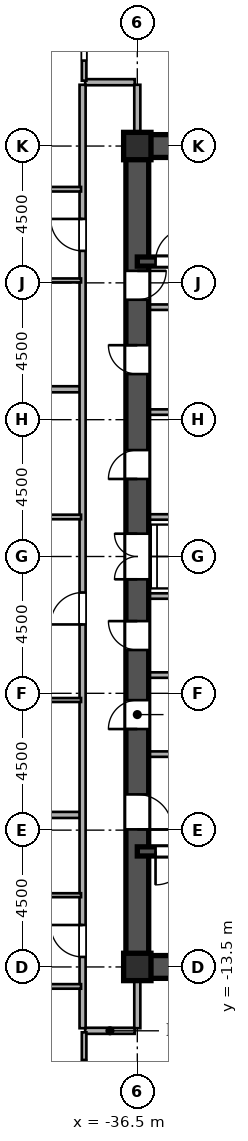
"""IFC4 building model, lengths in metres.
Left out: names, types, materials, properties, quantities, classifications, styles, units other than length and angle.
Written with IfcOpenShell. Run it as: python <this file> out.ifc"""

import sys

from ifc_helpers import new_model, si_unit, direction, frame, frame_2d, origin, origin_2d, place, context, subcontext, project, spatial, rectangle, i_section, extrude, source, transform, mapped, element, fill, save


model = new_model("IFC4")
c1 = context("Model", 3, precision=1e-05, world=origin(), true_north=direction((0.0, 1.0)))
c2 = subcontext(c1, "Body", "Model", "MODEL_VIEW")
j1 = project(units=[si_unit("LENGTHUNIT", "METRE"), si_unit("PLANEANGLEUNIT", "RADIAN")], contexts=[c1])
p1 = place(None, origin())
s1 = spatial("IfcSite", under=j1, at=p1, CompositionType="ELEMENT")
p2 = place(p1, origin())
s2 = spatial("IfcBuilding", under=s1, at=p2, CompositionType="ELEMENT")
p3 = place(p2, frame((0.0, 0.0, 47.7)))
s3 = spatial("IfcBuildingStorey", under=s2, at=p3, CompositionType="ELEMENT", Elevation=47.7)
m1 = source(origin(), c2, "Body", "SweptSolid", [
    extrude(i_section(OverallWidth=0.9, OverallDepth=0.9, WebThickness=0.036, FlangeThickness=0.055, at=origin_2d()), origin(), (0.0, 0.0, 1.0), 3.6),
])
for number, where, z_axis, x_axis in (
    (1, (-36.5, -13.5, 0.0), (0.0, 0.0, 1.0), (1.0, 0.0, 0.0)),
    (2, (-36.5, 13.5, 0.0), (0.0, 0.0, 1.0), (1.0, 0.0, 0.0)),
):
    element("IfcColumn", number, at=place(p3, frame(where, z_axis=z_axis, x_axis=x_axis)), inside=s3, PredefinedType="COLUMN", context=c2, shape_type="MappedRepresentation", body=[
        mapped(m1, transform((0.0, 0.0, 0.0), scale=1.0)),
    ])
for number, where, z_axis, x_axis in (
    (3, (-36.5, -13.5, 0.0), (0.0, 0.0, 1.0), (1.0, 0.0, 0.0)),
    (4, (-36.5, 13.5, 0.0), (0.0, 0.0, 1.0), (1.0, 0.0, 0.0)),
):
    element("IfcWall", number, at=place(p3, frame(where, z_axis=z_axis, x_axis=x_axis)), inside=s3, PredefinedType="SHEAR", context=c2, shape_type="SweptSolid", body=[
        extrude(rectangle(XDim=9.0, YDim=0.75, at=frame_2d((4.5, 0.0))), origin(), (0.0, 0.0, 1.0), 3.38),
    ])
p4 = place(p3, frame((-36.5, -13.65, 0.0), z_axis=(0.0, 0.0, 1.0), x_axis=(0.0, 1.0, 0.0)))
e5 = element("IfcWall", 5, at=p4, inside=s3, PredefinedType="SHEAR", context=c2, shape_type="SweptSolid", body=[
    extrude(rectangle(XDim=7.15, YDim=0.75, at=frame_2d((3.575, 0.0))), origin(), (0.0, 0.0, 1.0), 3.38),
])
p5 = place(p4, frame((4.675, 0.0, 0.0)))
e6 = element("IfcOpeningElement", 6, at=p5, cuts=e5, PredefinedType="OPENING", context=c2, shape_type="SweptSolid", body=[
    extrude(rectangle(XDim=1.15, YDim=2.2, at=frame_2d((0.575, 1.1))), frame((0.0, 0.385, 0.0), z_axis=(0.0, -1.0, 0.0), x_axis=(1.0, 0.0, 0.0)), (0.0, 0.0, 1.0), 0.77),
])
p6 = place(p3, frame((-36.5, -1.3, 0.0), z_axis=(0.0, 0.0, 1.0), x_axis=(0.0, 1.0, 0.0)))
e7 = element("IfcWall", 7, at=p6, inside=s3, PredefinedType="SHEAR", context=c2, shape_type="SweptSolid", body=[
    extrude(rectangle(XDim=2.6, YDim=0.75, at=frame_2d((1.3, 0.0))), origin(), (0.0, 0.0, 1.0), 3.38),
])
p7 = place(p6, frame((0.55, 0.0, 0.0)))
e8 = element("IfcOpeningElement", 8, at=p7, cuts=e7, PredefinedType="OPENING", context=c2, shape_type="SweptSolid", body=[
    extrude(rectangle(XDim=1.5, YDim=2.3, at=frame_2d((0.75, 1.15))), frame((0.0, 0.385, 0.0), z_axis=(0.0, -1.0, 0.0), x_axis=(1.0, 0.0, 0.0)), (0.0, 0.0, 1.0), 0.77),
])
p8 = place(p3, frame((-36.5, 8.2, 0.0), z_axis=(0.0, 0.0, 1.0), x_axis=(0.0, 1.0, 0.0)))
e9 = element("IfcWall", 9, at=p8, inside=s3, PredefinedType="SHEAR", context=c2, shape_type="SweptSolid", body=[
    extrude(rectangle(XDim=5.45, YDim=0.75, at=frame_2d((2.725, 0.0))), origin(), (0.0, 0.0, 1.0), 3.38),
])
p9 = place(p8, frame((0.245, 0.0, 0.0)))
e10 = element("IfcOpeningElement", 10, at=p9, cuts=e9, PredefinedType="OPENING", context=c2, shape_type="SweptSolid", body=[
    extrude(rectangle(XDim=0.95, YDim=2.15, at=frame_2d((0.475, 1.075))), frame((0.0, 0.385, 0.0), z_axis=(0.0, -1.0, 0.0), x_axis=(1.0, 0.0, 0.0)), (0.0, 0.0, 1.0), 0.77),
])
p10 = place(p3, frame((-36.5, -6.5, 0.0), z_axis=(0.0, 0.0, 1.0), x_axis=(0.0, 1.0, 0.0)))
e11 = element("IfcWall", 11, at=p10, inside=s3, PredefinedType="SHEAR", context=c2, shape_type="SweptSolid", body=[
    extrude(rectangle(XDim=2.6, YDim=0.75, at=frame_2d((1.3, 0.0))), origin(), (0.0, 0.0, 1.0), 3.38),
])
p11 = place(p10, frame((0.825, 0.0, 0.0)))
e12 = element("IfcOpeningElement", 12, at=p11, cuts=e11, PredefinedType="OPENING", context=c2, shape_type="SweptSolid", body=[
    extrude(rectangle(XDim=0.95, YDim=2.15, at=frame_2d((0.475, 1.075))), frame((0.0, 0.385, 0.0), z_axis=(0.0, -1.0, 0.0), x_axis=(1.0, 0.0, 0.0)), (0.0, 0.0, 1.0), 0.77),
])
p12 = place(p3, frame((-36.5, -3.9, 0.0), z_axis=(0.0, 0.0, 1.0), x_axis=(0.0, 1.0, 0.0)))
e13 = element("IfcWall", 13, at=p12, inside=s3, PredefinedType="SHEAR", context=c2, shape_type="SweptSolid", body=[
    extrude(rectangle(XDim=2.6, YDim=0.75, at=frame_2d((1.3, 0.0))), origin(), (0.0, 0.0, 1.0), 3.38),
])
p13 = place(p12, frame((0.825, 0.0, 0.0)))
e14 = element("IfcOpeningElement", 14, at=p13, cuts=e13, PredefinedType="OPENING", context=c2, shape_type="SweptSolid", body=[
    extrude(rectangle(XDim=0.95, YDim=2.15, at=frame_2d((0.475, 1.075))), frame((0.0, 0.385, 0.0), z_axis=(0.0, -1.0, 0.0), x_axis=(1.0, 0.0, 0.0)), (0.0, 0.0, 1.0), 0.77),
])
p14 = place(p3, frame((-36.5, 1.3, 0.0), z_axis=(0.0, 0.0, 1.0), x_axis=(0.0, 1.0, 0.0)))
e15 = element("IfcWall", 15, at=p14, inside=s3, PredefinedType="SHEAR", context=c2, shape_type="SweptSolid", body=[
    extrude(rectangle(XDim=3.45, YDim=0.75, at=frame_2d((1.725, 0.0))), origin(), (0.0, 0.0, 1.0), 3.38),
])
p15 = place(p14, frame((1.25, 0.0, 0.0)))
e16 = element("IfcOpeningElement", 16, at=p15, cuts=e15, PredefinedType="OPENING", context=c2, shape_type="SweptSolid", body=[
    extrude(rectangle(XDim=0.95, YDim=2.15, at=frame_2d((0.475, 1.075))), frame((0.0, 0.385, 0.0), z_axis=(0.0, -1.0, 0.0), x_axis=(1.0, 0.0, 0.0)), (0.0, 0.0, 1.0), 0.77),
])
p16 = place(p3, frame((-36.5, 4.75, 0.0), z_axis=(0.0, 0.0, 1.0), x_axis=(0.0, 1.0, 0.0)))
e17 = element("IfcWall", 17, at=p16, inside=s3, PredefinedType="SHEAR", context=c2, shape_type="SweptSolid", body=[
    extrude(rectangle(XDim=3.45, YDim=0.75, at=frame_2d((1.725, 0.0))), origin(), (0.0, 0.0, 1.0), 3.38),
])
p17 = place(p16, frame((1.25, 0.0, 0.0)))
e18 = element("IfcOpeningElement", 18, at=p17, cuts=e17, PredefinedType="OPENING", context=c2, shape_type="SweptSolid", body=[
    extrude(rectangle(XDim=0.95, YDim=2.15, at=frame_2d((0.475, 1.075))), frame((0.0, 0.385, 0.0), z_axis=(0.0, -1.0, 0.0), x_axis=(1.0, 0.0, 0.0)), (0.0, 0.0, 1.0), 0.77),
])
p18 = place(p3, frame((-36.5, -9.7, 0.0), z_axis=(0.0, 0.0, 1.0), x_axis=(1.0, 0.0, 0.0)))
e19 = element("IfcWall", 19, at=p18, inside=s3, PredefinedType="SHEAR", context=c2, shape_type="SweptSolid", body=[
    extrude(rectangle(XDim=9.0, YDim=0.3, at=frame_2d((4.5, 0.0))), origin(), (0.0, 0.0, 1.0), 3.38),
])
p19 = place(p18, frame((0.6, 0.0, 0.0)))
e20 = element("IfcOpeningElement", 20, at=p19, cuts=e19, PredefinedType="OPENING", context=c2, shape_type="SweptSolid", body=[
    extrude(rectangle(XDim=1.1, YDim=2.2, at=frame_2d((0.55, 1.1))), frame((0.0, 0.16, 0.0), z_axis=(0.0, -1.0, 0.0), x_axis=(1.0, 0.0, 0.0)), (0.0, 0.0, 1.0), 0.32),
])
p20 = place(p3, frame((-36.5, 9.7, 0.0), z_axis=(0.0, 0.0, 1.0), x_axis=(1.0, 0.0, 0.0)))
e21 = element("IfcWall", 21, at=p20, inside=s3, PredefinedType="SHEAR", context=c2, shape_type="SweptSolid", body=[
    extrude(rectangle(XDim=9.0, YDim=0.3, at=frame_2d((4.5, 0.0))), origin(), (0.0, 0.0, 1.0), 3.38),
])
p21 = place(p20, frame((0.6, 0.0, 0.0)))
e22 = element("IfcOpeningElement", 22, at=p21, cuts=e21, PredefinedType="OPENING", context=c2, shape_type="SweptSolid", body=[
    extrude(rectangle(XDim=1.1, YDim=2.2, at=frame_2d((0.55, 1.1))), frame((0.0, 0.16, 0.0), z_axis=(0.0, -1.0, 0.0), x_axis=(1.0, 0.0, 0.0)), (0.0, 0.0, 1.0), 0.32),
])
for number, where, z_axis, x_axis in (
    (23, (-36.15, -6.5, 0.0), (0.0, 0.0, 1.0), (1.0, 0.0, 0.0)),
    (24, (-36.15, 8.2, 0.0), (0.0, 0.0, 1.0), (1.0, 0.0, 0.0)),
):
    element("IfcWall", number, at=place(p3, frame(where, z_axis=z_axis, x_axis=x_axis)), inside=s3, PredefinedType="PARTITIONING", context=c2, shape_type="SweptSolid", body=[
        extrude(rectangle(XDim=5.7, YDim=0.18, at=frame_2d((2.85, 0.0))), origin(), (0.0, 0.0, 1.0), 3.38),
    ])
for number, where, z_axis, x_axis in (
    (25, (-36.15, -1.3, 0.0), (0.0, 0.0, 1.0), (1.0, 0.0, 0.0)),
    (26, (-36.15, 1.3, 0.0), (0.0, 0.0, 1.0), (1.0, 0.0, 0.0)),
    (27, (-36.15, -3.9, 0.0), (0.0, 0.0, 1.0), (1.0, 0.0, 0.0)),
    (28, (-36.15, 4.75, 0.0), (0.0, 0.0, 1.0), (1.0, 0.0, 0.0)),
):
    element("IfcWall", number, at=place(p3, frame(where, z_axis=z_axis, x_axis=x_axis)), inside=s3, PredefinedType="PARTITIONING", context=c2, shape_type="SweptSolid", body=[
        extrude(rectangle(XDim=2.95, YDim=0.18, at=frame_2d((1.475, 0.0))), origin(), (0.0, 0.0, 1.0), 3.38),
    ])
p22 = place(p3, frame((-38.215, -15.6, 0.0), z_axis=(0.0, 0.0, 1.0), x_axis=(1.0, 0.0, 0.0)))
e29 = element("IfcWall", 29, at=p22, inside=s3, PredefinedType="PARTITIONING", context=c2, shape_type="SweptSolid", body=[
    extrude(rectangle(XDim=1.63, YDim=0.2, at=frame_2d((0.815, 0.0))), origin(), (0.0, 0.0, 1.0), 3.38),
])
p23 = place(p3, frame((-44.45, -14.14, 0.0), z_axis=(0.0, 0.0, 1.0), x_axis=(1.0, 0.0, 0.0)))
e30 = element("IfcWall", 30, at=p23, inside=s3, PredefinedType="PARTITIONING", context=c2, shape_type="SweptSolid", body=[
    extrude(rectangle(XDim=6.1, YDim=0.15, at=frame_2d((3.05, 0.0))), origin(), (0.0, 0.0, 1.0), 3.38),
])
p24 = place(p23, frame((2.575, 0.0, 0.0)))
e31 = element("IfcOpeningElement", 31, at=p24, cuts=e30, PredefinedType="OPENING", context=c2, shape_type="SweptSolid", body=[
    extrude(rectangle(XDim=0.95, YDim=2.15, at=frame_2d((0.475, 1.075))), frame((0.0, 0.085, 0.0), z_axis=(0.0, -1.0, 0.0), x_axis=(1.0, 0.0, 0.0)), (0.0, 0.0, 1.0), 0.17),
])
p25 = place(p3, frame((-44.45, -11.14, 0.0), z_axis=(0.0, 0.0, 1.0), x_axis=(1.0, 0.0, 0.0)))
e32 = element("IfcWall", 32, at=p25, inside=s3, PredefinedType="PARTITIONING", context=c2, shape_type="SweptSolid", body=[
    extrude(rectangle(XDim=6.1, YDim=0.13, at=frame_2d((3.05, 0.0))), origin(), (0.0, 0.0, 1.0), 3.38),
])
p26 = place(p25, frame((2.61, 0.0, 0.0)))
e33 = element("IfcOpeningElement", 33, at=p26, cuts=e32, PredefinedType="OPENING", context=c2, shape_type="SweptSolid", body=[
    extrude(rectangle(XDim=0.88, YDim=2.1, at=frame_2d((0.44, 1.05))), frame((0.0, 0.075, 0.0), z_axis=(0.0, -1.0, 0.0), x_axis=(1.0, 0.0, 0.0)), (0.0, 0.0, 1.0), 0.15),
])
p27 = place(p3, frame((-72.505, -8.5, 0.0), z_axis=(0.0, 0.0, 1.0), x_axis=(1.0, 0.0, 0.0)))
e34 = element("IfcWall", 34, at=p27, inside=s3, PredefinedType="PARTITIONING", context=c2, shape_type="SweptSolid", body=[
    extrude(rectangle(XDim=34.125, YDim=0.2, at=frame_2d((17.062, 0.0))), origin(), (0.0, 0.0, 1.0), 3.38),
])
p28 = place(p3, frame((-44.45, -4.72, 0.0), z_axis=(0.0, 0.0, 1.0), x_axis=(1.0, 0.0, 0.0)))
e35 = element("IfcWall", 35, at=p28, inside=s3, PredefinedType="PARTITIONING", context=c2, shape_type="SweptSolid", body=[
    extrude(rectangle(XDim=6.1, YDim=0.13, at=frame_2d((3.05, 0.0))), origin(), (0.0, 0.0, 1.0), 3.38),
])
p29 = place(p28, frame((2.61, 0.0, 0.0)))
e36 = element("IfcOpeningElement", 36, at=p29, cuts=e35, PredefinedType="OPENING", context=c2, shape_type="SweptSolid", body=[
    extrude(rectangle(XDim=0.88, YDim=2.1, at=frame_2d((0.44, 1.05))), frame((0.0, 0.075, 0.0), z_axis=(0.0, -1.0, 0.0), x_axis=(1.0, 0.0, 0.0)), (0.0, 0.0, 1.0), 0.15),
])
p30 = place(p3, frame((-44.45, 1.3, 0.0), z_axis=(0.0, 0.0, 1.0), x_axis=(1.0, 0.0, 0.0)))
e37 = element("IfcWall", 37, at=p30, inside=s3, PredefinedType="PARTITIONING", context=c2, shape_type="SweptSolid", body=[
    extrude(rectangle(XDim=6.1, YDim=0.15, at=frame_2d((3.05, 0.0))), origin(), (0.0, 0.0, 1.0), 3.38),
])
p31 = place(p30, frame((2.575, 0.0, 0.0)))
e38 = element("IfcOpeningElement", 38, at=p31, cuts=e37, PredefinedType="OPENING", context=c2, shape_type="SweptSolid", body=[
    extrude(rectangle(XDim=0.95, YDim=2.15, at=frame_2d((0.475, 1.075))), frame((0.0, 0.085, 0.0), z_axis=(0.0, -1.0, 0.0), x_axis=(1.0, 0.0, 0.0)), (0.0, 0.0, 1.0), 0.17),
])
p32 = place(p3, frame((-72.505, 5.5, 0.0), z_axis=(0.0, 0.0, 1.0), x_axis=(1.0, 0.0, 0.0)))
e39 = element("IfcWall", 39, at=p32, inside=s3, PredefinedType="PARTITIONING", context=c2, shape_type="SweptSolid", body=[
    extrude(rectangle(XDim=34.125, YDim=0.2, at=frame_2d((17.062, 0.0))), origin(), (0.0, 0.0, 1.0), 3.38),
])
p33 = place(p3, frame((-44.45, 9.08, 0.0), z_axis=(0.0, 0.0, 1.0), x_axis=(1.0, 0.0, 0.0)))
e40 = element("IfcWall", 40, at=p33, inside=s3, PredefinedType="PARTITIONING", context=c2, shape_type="SweptSolid", body=[
    extrude(rectangle(XDim=6.1, YDim=0.13, at=frame_2d((3.05, 0.0))), origin(), (0.0, 0.0, 1.0), 3.38),
])
p34 = place(p33, frame((2.61, 0.0, 0.0)))
e41 = element("IfcOpeningElement", 41, at=p34, cuts=e40, PredefinedType="OPENING", context=c2, shape_type="SweptSolid", body=[
    extrude(rectangle(XDim=0.88, YDim=2.1, at=frame_2d((0.44, 1.05))), frame((0.0, 0.075, 0.0), z_axis=(0.0, -1.0, 0.0), x_axis=(1.0, 0.0, 0.0)), (0.0, 0.0, 1.0), 0.15),
])
p35 = place(p3, frame((-44.45, 12.08, 0.0), z_axis=(0.0, 0.0, 1.0), x_axis=(1.0, 0.0, 0.0)))
e42 = element("IfcWall", 42, at=p35, inside=s3, PredefinedType="PARTITIONING", context=c2, shape_type="SweptSolid", body=[
    extrude(rectangle(XDim=6.1, YDim=0.15, at=frame_2d((3.05, 0.0))), origin(), (0.0, 0.0, 1.0), 3.38),
])
p36 = place(p35, frame((2.575, 0.0, 0.0)))
e43 = element("IfcOpeningElement", 43, at=p36, cuts=e42, PredefinedType="OPENING", context=c2, shape_type="SweptSolid", body=[
    extrude(rectangle(XDim=0.95, YDim=2.15, at=frame_2d((0.475, 1.075))), frame((0.0, 0.085, 0.0), z_axis=(0.0, -1.0, 0.0), x_axis=(1.0, 0.0, 0.0)), (0.0, 0.0, 1.0), 0.17),
])
p37 = place(p3, frame((-38.215, 15.6, 0.0), z_axis=(0.0, 0.0, 1.0), x_axis=(1.0, 0.0, 0.0)))
e44 = element("IfcWall", 44, at=p37, inside=s3, PredefinedType="PARTITIONING", context=c2, shape_type="SweptSolid", body=[
    extrude(rectangle(XDim=1.63, YDim=0.2, at=frame_2d((0.815, 0.0))), origin(), (0.0, 0.0, 1.0), 3.38),
])
p38 = place(p3, frame((-38.3, -15.515, 0.0), z_axis=(0.0, 0.0, 1.0), x_axis=(0.0, 1.0, 0.0)))
e45 = element("IfcWall", 45, at=p38, inside=s3, PredefinedType="PARTITIONING", context=c2, shape_type="SweptSolid", body=[
    extrude(rectangle(XDim=31.03, YDim=0.2, at=frame_2d((15.515, 0.0))), origin(), (0.0, 0.0, 1.0), 3.38),
])
p39 = place(p38, frame((2.345, 0.0, 0.0)))
e46 = element("IfcOpeningElement", 46, at=p39, cuts=e45, PredefinedType="OPENING", context=c2, shape_type="SweptSolid", body=[
    extrude(rectangle(XDim=1.05, YDim=2.25, at=frame_2d((0.525, 1.125))), frame((0.0, 0.11, 0.0), z_axis=(0.0, -1.0, 0.0), x_axis=(1.0, 0.0, 0.0)), (0.0, 0.0, 1.0), 0.22),
])
p40 = place(p38, frame((13.28, 0.0, 0.0)))
e47 = element("IfcOpeningElement", 47, at=p40, cuts=e45, PredefinedType="OPENING", context=c2, shape_type="SweptSolid", body=[
    extrude(rectangle(XDim=1.05, YDim=2.25, at=frame_2d((0.525, 1.125))), frame((0.0, 0.11, 0.0), z_axis=(0.0, -1.0, 0.0), x_axis=(1.0, 0.0, 0.0)), (0.0, 0.0, 1.0), 0.22),
])
p41 = place(p38, frame((25.567, 0.0, 0.0)))
e48 = element("IfcOpeningElement", 48, at=p41, cuts=e45, PredefinedType="OPENING", context=c2, shape_type="SweptSolid", body=[
    extrude(rectangle(XDim=1.05, YDim=2.25, at=frame_2d((0.525, 1.125))), frame((0.0, 0.11, 0.0), z_axis=(0.0, -1.0, 0.0), x_axis=(1.0, 0.0, 0.0)), (0.0, 0.0, 1.0), 0.22),
])
p42 = place(p3, frame((-38.25, -23.898, 0.0), z_axis=(0.0, 0.0, 1.0), x_axis=(0.0, 1.0, 0.0)))
e49 = element("IfcWall", 49, at=p42, inside=s3, PredefinedType="PARTITIONING", context=c2, shape_type="SweptSolid", body=[
    extrude(rectangle(XDim=8.248, YDim=0.15, at=frame_2d((4.124, 0.0))), origin(), (0.0, 0.0, 1.0), 3.38),
])
p43 = place(p42, frame((6.391, 0.0, 0.0)))
e50 = element("IfcOpeningElement", 50, at=p43, cuts=e49, PredefinedType="OPENING", context=c2, shape_type="SweptSolid", body=[
    extrude(rectangle(XDim=0.95, YDim=2.15, at=frame_2d((0.475, 1.075))), frame((0.0, 0.085, 0.0), z_axis=(0.0, -1.0, 0.0), x_axis=(1.0, 0.0, 0.0)), (0.0, 0.0, 1.0), 0.17),
])
p44 = place(p3, frame((-38.25, 15.65, 0.0), z_axis=(0.0, 0.0, 1.0), x_axis=(0.0, 1.0, 0.0)))
e51 = element("IfcWall", 51, at=p44, inside=s3, PredefinedType="PARTITIONING", context=c2, shape_type="SweptSolid", body=[
    extrude(rectangle(XDim=8.248, YDim=0.15, at=frame_2d((4.124, 0.0))), origin(), (0.0, 0.0, 1.0), 3.38),
])
p45 = place(p44, frame((0.66, 0.0, 0.0)))
e52 = element("IfcOpeningElement", 52, at=p45, cuts=e51, PredefinedType="OPENING", context=c2, shape_type="SweptSolid", body=[
    extrude(rectangle(XDim=0.95, YDim=2.15, at=frame_2d((0.475, 1.075))), frame((0.0, 0.085, 0.0), z_axis=(0.0, -1.0, 0.0), x_axis=(1.0, 0.0, 0.0)), (0.0, 0.0, 1.0), 0.17),
])
p46 = place(p44, frame((2.985, 0.0, 0.0)))
e53 = element("IfcOpeningElement", 53, at=p46, cuts=e51, PredefinedType="OPENING", context=c2, shape_type="SweptSolid", body=[
    extrude(rectangle(XDim=0.95, YDim=2.15, at=frame_2d((0.475, 1.075))), frame((0.0, 0.085, 0.0), z_axis=(0.0, -1.0, 0.0), x_axis=(1.0, 0.0, 0.0)), (0.0, 0.0, 1.0), 0.17),
])
for number, where, z_axis, x_axis in (
    (54, (-36.5, -15.515, 0.0), (0.0, 0.0, 1.0), (0.0, 1.0, 0.0)),
    (55, (-36.5, 13.88, 0.0), (0.0, 0.0, 1.0), (0.0, 1.0, 0.0)),
):
    element("IfcWall", number, at=place(p3, frame(where, z_axis=z_axis, x_axis=x_axis)), inside=s3, PredefinedType="PARTITIONING", context=c2, shape_type="SweptSolid", body=[
        extrude(rectangle(XDim=1.635, YDim=0.2, at=frame_2d((0.817, 0.0))), origin(), (0.0, 0.0, 1.0), 2.68),
    ])
m2 = source(origin(), c2, "Body", "SweptSolid", [
    extrude(rectangle(XDim=1.15, YDim=2.2, at=frame_2d((0.575, 1.1))), frame((0.0, 0.025, 0.0), z_axis=(0.0, -1.0, 0.0), x_axis=(1.0, 0.0, 0.0)), (0.0, 0.0, 1.0), 0.05),
])
p47 = place(p5, frame((1.15, 0.0, 0.0), z_axis=(0.0, 0.0, 1.0), x_axis=(-1.0, 0.0, 0.0)))
e56 = element("IfcDoor", 56, at=p47, inside=s3, OperationType="SINGLE_SWING_LEFT", PredefinedType="DOOR", context=c2, shape_type="MappedRepresentation", body=[
    mapped(m2, transform((0.0, 0.0, 0.0), scale=1.0)),
])
fill(e6, e56)
m3 = source(origin(), c2, "Body", "SweptSolid", [
    extrude(rectangle(XDim=1.5, YDim=2.3, at=frame_2d((0.75, 1.15))), frame((0.0, 0.025, 0.0), z_axis=(0.0, -1.0, 0.0), x_axis=(1.0, 0.0, 0.0)), (0.0, 0.0, 1.0), 0.05),
])
p48 = place(p7, origin())
e57 = element("IfcDoor", 57, at=p48, inside=s3, OperationType="DOUBLE_SWING_LEFT", PredefinedType="DOOR", context=c2, shape_type="MappedRepresentation", body=[
    mapped(m3, transform((0.0, 0.0, 0.0), scale=1.0)),
])
fill(e8, e57)
m4 = source(origin(), c2, "Body", "SweptSolid", [
    extrude(rectangle(XDim=0.95, YDim=2.15, at=frame_2d((0.475, 1.075))), frame((0.0, 0.025, 0.0), z_axis=(0.0, -1.0, 0.0), x_axis=(1.0, 0.0, 0.0)), (0.0, 0.0, 1.0), 0.05),
])
p49 = place(p9, frame((0.95, 0.0, 0.0), z_axis=(0.0, 0.0, 1.0), x_axis=(-1.0, 0.0, 0.0)))
e58 = element("IfcDoor", 58, at=p49, inside=s3, OperationType="SINGLE_SWING_RIGHT", PredefinedType="DOOR", context=c2, shape_type="MappedRepresentation", body=[
    mapped(m4, transform((0.0, 0.0, 0.0), scale=1.0)),
])
fill(e10, e58)
p50 = place(p11, origin())
e59 = element("IfcDoor", 59, at=p50, inside=s3, OperationType="SINGLE_SWING_LEFT", PredefinedType="DOOR", context=c2, shape_type="MappedRepresentation", body=[
    mapped(m4, transform((0.0, 0.0, 0.0), scale=1.0)),
])
fill(e12, e59)
p51 = place(p13, origin())
e60 = element("IfcDoor", 60, at=p51, inside=s3, OperationType="SINGLE_SWING_RIGHT", PredefinedType="DOOR", context=c2, shape_type="MappedRepresentation", body=[
    mapped(m4, transform((0.0, 0.0, 0.0), scale=1.0)),
])
fill(e14, e60)
p52 = place(p15, origin())
e61 = element("IfcDoor", 61, at=p52, inside=s3, OperationType="SINGLE_SWING_LEFT", PredefinedType="DOOR", context=c2, shape_type="MappedRepresentation", body=[
    mapped(m4, transform((0.0, 0.0, 0.0), scale=1.0)),
])
fill(e16, e61)
p53 = place(p17, origin())
e62 = element("IfcDoor", 62, at=p53, inside=s3, OperationType="SINGLE_SWING_RIGHT", PredefinedType="DOOR", context=c2, shape_type="MappedRepresentation", body=[
    mapped(m4, transform((0.0, 0.0, 0.0), scale=1.0)),
])
fill(e18, e62)
m5 = source(origin(), c2, "Body", "SweptSolid", [
    extrude(rectangle(XDim=1.1, YDim=2.2, at=frame_2d((0.55, 1.1))), frame((0.0, 0.025, 0.0), z_axis=(0.0, -1.0, 0.0), x_axis=(1.0, 0.0, 0.0)), (0.0, 0.0, 1.0), 0.05),
])
p54 = place(p19, frame((1.1, 0.0, 0.0), z_axis=(0.0, 0.0, 1.0), x_axis=(-1.0, 0.0, 0.0)))
e63 = element("IfcDoor", 63, at=p54, inside=s3, OperationType="SINGLE_SWING_LEFT", PredefinedType="DOOR", context=c2, shape_type="MappedRepresentation", body=[
    mapped(m5, transform((0.0, 0.0, 0.0), scale=1.0)),
])
fill(e20, e63)
p55 = place(p21, origin())
e64 = element("IfcDoor", 64, at=p55, inside=s3, OperationType="SINGLE_SWING_RIGHT", PredefinedType="DOOR", context=c2, shape_type="MappedRepresentation", body=[
    mapped(m5, transform((0.0, 0.0, 0.0), scale=1.0)),
])
fill(e22, e64)
m6 = source(origin(), c2, "Body", "SweptSolid", [
    extrude(rectangle(XDim=1.05, YDim=2.25, at=frame_2d((0.525, 1.125))), frame((0.0, 0.025, 0.0), z_axis=(0.0, -1.0, 0.0), x_axis=(1.0, 0.0, 0.0)), (0.0, 0.0, 1.0), 0.05),
])
p56 = place(p39, origin())
e65 = element("IfcDoor", 65, at=p56, inside=s3, OperationType="SINGLE_SWING_RIGHT", PredefinedType="DOOR", context=c2, shape_type="MappedRepresentation", body=[
    mapped(m6, transform((0.0, 0.0, 0.0), scale=1.0)),
])
fill(e46, e65)
p57 = place(p40, origin())
e66 = element("IfcDoor", 66, at=p57, inside=s3, OperationType="SINGLE_SWING_LEFT", PredefinedType="DOOR", context=c2, shape_type="MappedRepresentation", body=[
    mapped(m6, transform((0.0, 0.0, 0.0), scale=1.0)),
])
fill(e47, e66)
p58 = place(p41, origin())
e67 = element("IfcDoor", 67, at=p58, inside=s3, OperationType="SINGLE_SWING_RIGHT", PredefinedType="DOOR", context=c2, shape_type="MappedRepresentation", body=[
    mapped(m6, transform((0.0, 0.0, 0.0), scale=1.0)),
])
fill(e48, e67)
save(model, sys.argv[1])
